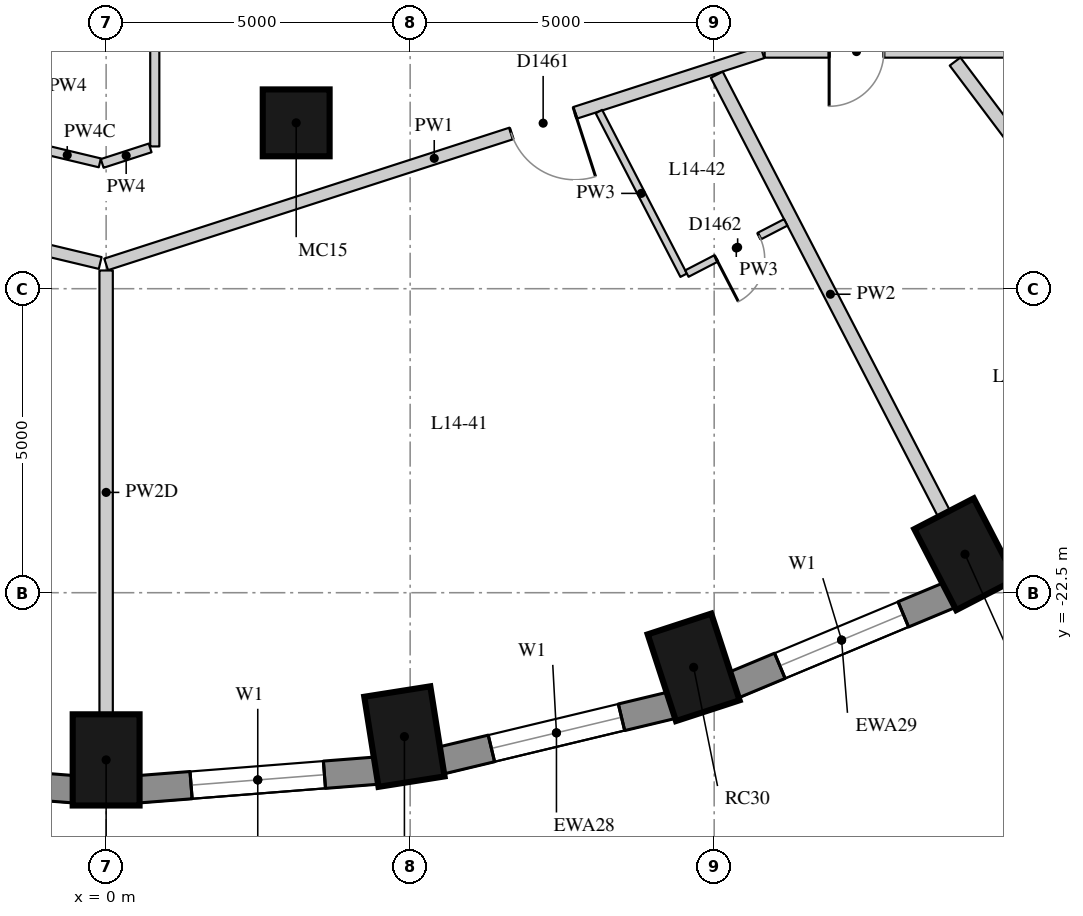
"""IFC4 building model, lengths in metres.
Left out: names, types, materials, properties, quantities, classifications, styles, units other than length and angle.
Written with IfcOpenShell. Run it as: python <this file> out.ifc"""

import sys

from ifc_helpers import new_model, si_unit, direction, frame, frame_2d, origin, origin_2d, place, context, subcontext, project, spatial, rectangle, extrude, element, fill, save


model = new_model("IFC4")
c1 = context("Model", 3, precision=1e-05, world=origin(), true_north=direction((0.0, 1.0)))
c2 = subcontext(c1, "Body", "Model", "MODEL_VIEW")
j1 = project(units=[si_unit("LENGTHUNIT", "METRE"), si_unit("PLANEANGLEUNIT", "RADIAN")], contexts=[c1])
p1 = place(None, origin())
s1 = spatial("IfcSite", under=j1, at=p1, CompositionType="ELEMENT")
p2 = place(p1, origin())
s2 = spatial("IfcBuilding", under=s1, at=p2, CompositionType="ELEMENT")
p3 = place(p2, frame((0.0, 0.0, 54.7)))
s3 = spatial("IfcBuildingStorey", under=s2, at=p3, CompositionType="ELEMENT", Elevation=54.7)
for number, where, z_axis, x_axis in (
    (1, (0.0, -25.25, 0.0), (0.0, 0.0, 1.0), (0.0, -1.0, 0.0)),
    (2, (4.906, -24.866, 0.0), (0.0, 0.0, 1.0), (0.156, -0.988, 0.0)),
    (3, (9.662, -23.727, 0.0), (0.0, 0.0, 1.0), (0.31, -0.951, 0.0)),
    (4, (14.125, -21.867, 0.0), (0.0, 0.0, 1.0), (0.46, -0.888, 0.0)),
):
    element("IfcColumn", number, at=place(p3, frame(where, z_axis=z_axis, x_axis=x_axis)), inside=s3, PredefinedType="COLUMN", context=c2, shape_type="SweptSolid", body=[
        extrude(rectangle(XDim=1.5, YDim=1.1, at=origin_2d()), origin(), (0.0, 0.0, 1.0), 3.3),
    ])
p4 = place(p3, frame((3.126, -14.772, 0.0), z_axis=(0.0, 0.0, 1.0), x_axis=(1.0, 0.0, 0.0)))
e5 = element("IfcColumn", 5, at=p4, inside=s3, PredefinedType="COLUMN", context=c2, shape_type="SweptSolid", body=[
    extrude(rectangle(XDim=1.1, YDim=1.1, at=origin_2d()), origin(), (0.0, 0.0, 1.0), 3.3),
])
p5 = place(p3, frame((-4.457, -25.426, 0.0), z_axis=(0.0, 0.0, 1.0), x_axis=(0.996955972145, -0.077966592873, 0.0)))
e6 = element("IfcWall", 6, at=p5, inside=s3, PredefinedType="SOLIDWALL", context=c2, shape_type="SweptSolid", body=[
    extrude(rectangle(XDim=3.939, YDim=0.45, at=frame_2d((1.97, 0.0))), origin(), (0.0, 0.0, 1.0), 3.02),
])
p6 = place(p5, frame((0.87, 0.0, 0.4)))
e7 = element("IfcOpeningElement", 7, at=p6, cuts=e6, PredefinedType="OPENING", context=c2, shape_type="SweptSolid", body=[
    extrude(rectangle(XDim=2.2, YDim=1.75, at=frame_2d((1.1, 0.875))), frame((0.0, 0.235, 0.0), z_axis=(0.0, -1.0, 0.0), x_axis=(1.0, 0.0, 0.0)), (0.0, 0.0, 1.0), 0.47),
])
p7 = place(p3, frame((0.53, -25.733, 0.0), z_axis=(0.0, 0.0, 1.0), x_axis=(0.996955972145, 0.077966592873, 0.0)))
e8 = element("IfcWall", 8, at=p7, inside=s3, PredefinedType="SOLIDWALL", context=c2, shape_type="SweptSolid", body=[
    extrude(rectangle(XDim=3.939, YDim=0.45, at=frame_2d((1.97, 0.0))), origin(), (0.0, 0.0, 1.0), 3.02),
])
p8 = place(p7, frame((0.87, 0.0, 0.4)))
e9 = element("IfcOpeningElement", 9, at=p8, cuts=e8, PredefinedType="OPENING", context=c2, shape_type="SweptSolid", body=[
    extrude(rectangle(XDim=2.2, YDim=1.75, at=frame_2d((1.1, 0.875))), frame((0.0, 0.235, 0.0), z_axis=(0.0, -1.0, 0.0), x_axis=(1.0, 0.0, 0.0)), (0.0, 0.0, 1.0), 0.47),
])
p9 = place(p3, frame((5.504, -25.26, 0.0), z_axis=(0.0, 0.0, 1.0), x_axis=(0.972496561493, 0.232917233979, 0.0)))
e10 = element("IfcWall", 10, at=p9, inside=s3, PredefinedType="SOLIDWALL", context=c2, shape_type="SweptSolid", body=[
    extrude(rectangle(XDim=3.911, YDim=0.45, at=frame_2d((1.956, 0.0))), origin(), (0.0, 0.0, 1.0), 3.02),
])
p10 = place(p9, frame((0.855, 0.0, 0.4)))
e11 = element("IfcOpeningElement", 11, at=p10, cuts=e10, PredefinedType="OPENING", context=c2, shape_type="SweptSolid", body=[
    extrude(rectangle(XDim=2.2, YDim=1.75, at=frame_2d((1.1, 0.875))), frame((0.0, 0.235, 0.0), z_axis=(0.0, -1.0, 0.0), x_axis=(1.0, 0.0, 0.0)), (0.0, 0.0, 1.0), 0.47),
])
p11 = place(p3, frame((10.315, -24.021, 0.0), z_axis=(0.0, 0.0, 1.0), x_axis=(0.923031964282, 0.384723267966, 0.0)))
e12 = element("IfcWall", 12, at=p11, inside=s3, PredefinedType="SOLIDWALL", context=c2, shape_type="SweptSolid", body=[
    extrude(rectangle(XDim=3.856, YDim=0.45, at=frame_2d((1.928, 0.0))), origin(), (0.0, 0.0, 1.0), 3.02),
])
p12 = place(p11, frame((0.828, 0.0, 0.4)))
e13 = element("IfcOpeningElement", 13, at=p12, cuts=e12, PredefinedType="OPENING", context=c2, shape_type="SweptSolid", body=[
    extrude(rectangle(XDim=2.2, YDim=1.75, at=frame_2d((1.1, 0.875))), frame((0.0, 0.235, 0.0), z_axis=(0.0, -1.0, 0.0), x_axis=(1.0, 0.0, 0.0)), (0.0, 0.0, 1.0), 0.47),
])
p13 = place(p3, frame((14.817, -22.051, 0.0), z_axis=(0.0, 0.0, 1.0), x_axis=(0.847635480093, 0.530579016629, 0.0)))
e14 = element("IfcWall", 14, at=p13, inside=s3, PredefinedType="SOLIDWALL", context=c2, shape_type="SweptSolid", body=[
    extrude(rectangle(XDim=3.782, YDim=0.45, at=frame_2d((1.891, 0.0))), origin(), (0.0, 0.0, 1.0), 3.02),
])
p14 = place(p13, frame((0.791, 0.0, 0.4)))
e15 = element("IfcOpeningElement", 15, at=p14, cuts=e14, PredefinedType="OPENING", context=c2, shape_type="SweptSolid", body=[
    extrude(rectangle(XDim=2.2, YDim=1.75, at=frame_2d((1.1, 0.875))), frame((0.0, 0.235, 0.0), z_axis=(0.0, -1.0, 0.0), x_axis=(1.0, 0.0, 0.0)), (0.0, 0.0, 1.0), 0.47),
])
p15 = place(p3, frame((20.7, -13.6, 0.0), z_axis=(0.0, 0.0, 1.0), x_axis=(-1.0, 0.0, 0.0)))
e16 = element("IfcWall", 16, at=p15, inside=s3, PredefinedType="PARTITIONING", context=c2, shape_type="SweptSolid", body=[
    extrude(rectangle(XDim=9.87, YDim=0.2, at=frame_2d((4.935, 0.0))), origin(), (0.0, 0.0, 1.0), 3.02),
])
p16 = place(p15, frame((7.909, 0.0, 0.0)))
e17 = element("IfcOpeningElement", 17, at=p16, cuts=e16, PredefinedType="OPENING", context=c2, shape_type="SweptSolid", body=[
    extrude(rectangle(XDim=0.9, YDim=2.1, at=frame_2d((0.45, 1.05))), frame((0.0, 0.11, 0.0), z_axis=(0.0, -1.0, 0.0), x_axis=(1.0, 0.0, 0.0)), (0.0, 0.0, 1.0), 0.22),
])
p17 = place(p15, frame((2.638, 0.0, 0.0)))
e18 = element("IfcOpeningElement", 18, at=p17, cuts=e16, PredefinedType="OPENING", context=c2, shape_type="SweptSolid", body=[
    extrude(rectangle(XDim=1.8, YDim=2.1, at=frame_2d((0.9, 1.05))), frame((0.0, 0.11, 0.0), z_axis=(0.0, -1.0, 0.0), x_axis=(1.0, 0.0, 0.0)), (0.0, 0.0, 1.0), 0.22),
])
p18 = place(p3, frame((10.792, -13.612, 0.0), z_axis=(0.0, 0.0, 1.0), x_axis=(-0.951542928403, -0.307515943336, 0.0)))
e19 = element("IfcWall", 19, at=p18, inside=s3, PredefinedType="PARTITIONING", context=c2, shape_type="SweptSolid", body=[
    extrude(rectangle(XDim=11.342, YDim=0.2, at=frame_2d((5.671, 0.0))), origin(), (0.0, 0.0, 1.0), 3.02),
])
p19 = place(p18, frame((3.239, 0.0, 0.0)))
e20 = element("IfcOpeningElement", 20, at=p19, cuts=e19, PredefinedType="OPENING", context=c2, shape_type="SweptSolid", body=[
    extrude(rectangle(XDim=1.1, YDim=2.1, at=frame_2d((0.55, 1.05))), frame((0.0, 0.11, 0.0), z_axis=(0.0, -1.0, 0.0), x_axis=(1.0, 0.0, 0.0)), (0.0, 0.0, 1.0), 0.22),
])
p20 = place(p3, frame((-0.098, -17.077, 0.0), z_axis=(0.0, 0.0, 1.0), x_axis=(-0.972607318404, 0.232454305588, 0.0)))
e21 = element("IfcWall", 21, at=p20, inside=s3, PredefinedType="PARTITIONING", context=c2, shape_type="SweptSolid", body=[
    extrude(rectangle(XDim=8.022, YDim=0.2, at=frame_2d((4.011, 0.0))), origin(), (0.0, 0.0, 1.0), 3.02),
])
p21 = place(p20, frame((1.479, 0.0, 0.0)))
e22 = element("IfcOpeningElement", 22, at=p21, cuts=e21, PredefinedType="OPENING", context=c2, shape_type="SweptSolid", body=[
    extrude(rectangle(XDim=1.1, YDim=2.1, at=frame_2d((0.55, 1.05))), frame((0.0, 0.11, 0.0), z_axis=(0.0, -1.0, 0.0), x_axis=(1.0, 0.0, 0.0)), (0.0, 0.0, 1.0), 0.22),
])
p22 = place(p3, frame((0.8, -9.23, 0.0), z_axis=(0.0, 0.0, 1.0), x_axis=(0.0, -1.0, 0.0)))
e23 = element("IfcWall", 23, at=p22, inside=s3, PredefinedType="PARTITIONING", context=c2, shape_type="SweptSolid", body=[
    extrude(rectangle(XDim=5.93, YDim=0.15, at=frame_2d((2.965, 0.0))), origin(), (0.0, 0.0, 1.0), 3.02),
])
p23 = place(p22, frame((2.515, 0.0, 0.0)))
e24 = element("IfcOpeningElement", 24, at=p23, cuts=e23, PredefinedType="OPENING", context=c2, shape_type="SweptSolid", body=[
    extrude(rectangle(XDim=0.9, YDim=2.1, at=frame_2d((0.45, 1.05))), frame((0.0, 0.085, 0.0), z_axis=(0.0, -1.0, 0.0), x_axis=(1.0, 0.0, 0.0)), (0.0, 0.0, 1.0), 0.17),
])
p24 = place(p3, frame((0.724, -15.184, 0.0), z_axis=(0.0, 0.0, 1.0), x_axis=(-0.951444518554, -0.307820285415, 0.0)))
e25 = element("IfcWall", 25, at=p24, inside=s3, PredefinedType="PARTITIONING", context=c2, shape_type="SweptSolid", body=[
    extrude(rectangle(XDim=0.829, YDim=0.15, at=frame_2d((0.415, 0.0))), origin(), (0.0, 0.0, 1.0), 3.02),
])
p25 = place(p3, frame((-0.104, -15.43, 0.0), z_axis=(0.0, 0.0, 1.0), x_axis=(-0.972630060885, 0.232359128642, 0.0)))
e26 = element("IfcWall", 26, at=p25, inside=s3, PredefinedType="PARTITIONING", context=c2, shape_type="SweptSolid", body=[
    extrude(rectangle(XDim=1.102, YDim=0.15, at=frame_2d((0.551, 0.0))), origin(), (0.0, 0.0, 1.0), 2.42),
])
p26 = place(p3, frame((0.0, -24.5, 0.0), z_axis=(0.0, 0.0, 1.0), x_axis=(0.0, 1.0, 0.0)))
e27 = element("IfcWall", 27, at=p26, inside=s3, PredefinedType="PARTITIONING", context=c2, shape_type="SweptSolid", body=[
    extrude(rectangle(XDim=7.3, YDim=0.22, at=frame_2d((3.65, 0.0))), origin(), (0.0, 0.0, 1.0), 2.47),
])
p27 = place(p3, frame((13.78, -21.201, 0.0), z_axis=(0.0, 0.0, 1.0), x_axis=(-0.459685115008, 0.888081975405, 0.0)))
e28 = element("IfcWall", 28, at=p27, inside=s3, PredefinedType="PARTITIONING", context=c2, shape_type="SweptSolid", body=[
    extrude(rectangle(XDim=8.131, YDim=0.22, at=frame_2d((4.065, 0.0))), origin(), (0.0, 0.0, 1.0), 3.02),
])
p28 = place(p3, frame((17.708, -18.743, 0.0), z_axis=(0.0, 0.0, 1.0), x_axis=(-0.601177883261, 0.799115231164, 0.0)))
e29 = element("IfcWall", 29, at=p28, inside=s3, PredefinedType="PARTITIONING", context=c2, shape_type="SweptSolid", body=[
    extrude(rectangle(XDim=6.231, YDim=0.22, at=frame_2d((3.116, 0.0))), origin(), (0.0, 0.0, 1.0), 3.02),
])
p29 = place(p3, frame((8.104, -14.586, 0.0), z_axis=(0.0, 0.0, 1.0), x_axis=(0.459668270166, -0.888090694357, 0.0)))
e30 = element("IfcWall", 30, at=p29, inside=s3, PredefinedType="PARTITIONING", context=c2, shape_type="SweptSolid", body=[
    extrude(rectangle(XDim=3.032, YDim=0.12, at=frame_2d((1.516, 0.0))), origin(), (0.0, 0.0, 1.0), 3.02),
])
p30 = place(p3, frame((9.551, -17.251, 0.0), z_axis=(0.0, 0.0, 1.0), x_axis=(0.88806930088, 0.459709600546, 0.0)))
e31 = element("IfcWall", 31, at=p30, inside=s3, PredefinedType="PARTITIONING", context=c2, shape_type="SweptSolid", body=[
    extrude(rectangle(XDim=1.83, YDim=0.12, at=frame_2d((0.915, 0.0))), origin(), (0.0, 0.0, 1.0), 3.02),
])
p31 = place(p30, frame((0.54, 0.0, 0.0)))
e32 = element("IfcOpeningElement", 32, at=p31, cuts=e31, PredefinedType="OPENING", context=c2, shape_type="SweptSolid", body=[
    extrude(rectangle(XDim=0.8, YDim=2.1, at=frame_2d((0.4, 1.05))), frame((0.0, 0.07, 0.0), z_axis=(0.0, -1.0, 0.0), x_axis=(1.0, 0.0, 0.0)), (0.0, 0.0, 1.0), 0.14),
])
p32 = place(p8, origin())
e33 = element("IfcWindow", 33, at=p32, inside=s3, PartitioningType="SINGLE_PANEL", PredefinedType="WINDOW", context=c2, shape_type="SweptSolid", body=[
    extrude(rectangle(XDim=2.2, YDim=1.75, at=frame_2d((1.1, 0.875))), frame((0.0, 0.035, 0.0), z_axis=(0.0, -1.0, 0.0), x_axis=(1.0, 0.0, 0.0)), (0.0, 0.0, 1.0), 0.06),
])
fill(e9, e33)
p33 = place(p10, origin())
e34 = element("IfcWindow", 34, at=p33, inside=s3, PartitioningType="SINGLE_PANEL", PredefinedType="WINDOW", context=c2, shape_type="SweptSolid", body=[
    extrude(rectangle(XDim=2.2, YDim=1.75, at=frame_2d((1.1, 0.875))), frame((0.0, 0.035, 0.0), z_axis=(0.0, -1.0, 0.0), x_axis=(1.0, 0.0, 0.0)), (0.0, 0.0, 1.0), 0.06),
])
fill(e11, e34)
p34 = place(p12, origin())
e35 = element("IfcWindow", 35, at=p34, inside=s3, PartitioningType="SINGLE_PANEL", PredefinedType="WINDOW", context=c2, shape_type="SweptSolid", body=[
    extrude(rectangle(XDim=2.2, YDim=1.75, at=frame_2d((1.1, 0.875))), frame((0.0, 0.035, 0.0), z_axis=(0.0, -1.0, 0.0), x_axis=(1.0, 0.0, 0.0)), (0.0, 0.0, 1.0), 0.06),
])
fill(e13, e35)
p35 = place(p19, origin())
e36 = element("IfcDoor", 36, at=p35, inside=s3, OperationType="SINGLE_SWING_LEFT", PredefinedType="DOOR", context=c2, shape_type="SweptSolid", body=[
    extrude(rectangle(XDim=1.1, YDim=2.1, at=frame_2d((0.55, 1.05))), frame((0.0, 0.025, 0.0), z_axis=(0.0, -1.0, 0.0), x_axis=(1.0, 0.0, 0.0)), (0.0, 0.0, 1.0), 0.05),
])
fill(e20, e36)
p36 = place(p31, origin())
e37 = element("IfcDoor", 37, at=p36, inside=s3, OperationType="SINGLE_SWING_RIGHT", PredefinedType="DOOR", context=c2, shape_type="SweptSolid", body=[
    extrude(rectangle(XDim=0.8, YDim=2.1, at=frame_2d((0.4, 1.05))), frame((0.0, 0.025, 0.0), z_axis=(0.0, -1.0, 0.0), x_axis=(1.0, 0.0, 0.0)), (0.0, 0.0, 1.0), 0.05),
])
fill(e32, e37)
p37 = place(p16, origin())
e38 = element("IfcDoor", 38, at=p37, inside=s3, OperationType="SINGLE_SWING_RIGHT", PredefinedType="DOOR", context=c2, shape_type="SweptSolid", body=[
    extrude(rectangle(XDim=0.9, YDim=2.1, at=frame_2d((0.45, 1.05))), frame((0.0, 0.025, 0.0), z_axis=(0.0, -1.0, 0.0), x_axis=(1.0, 0.0, 0.0)), (0.0, 0.0, 1.0), 0.05),
])
fill(e17, e38)
save(model, sys.argv[1])
